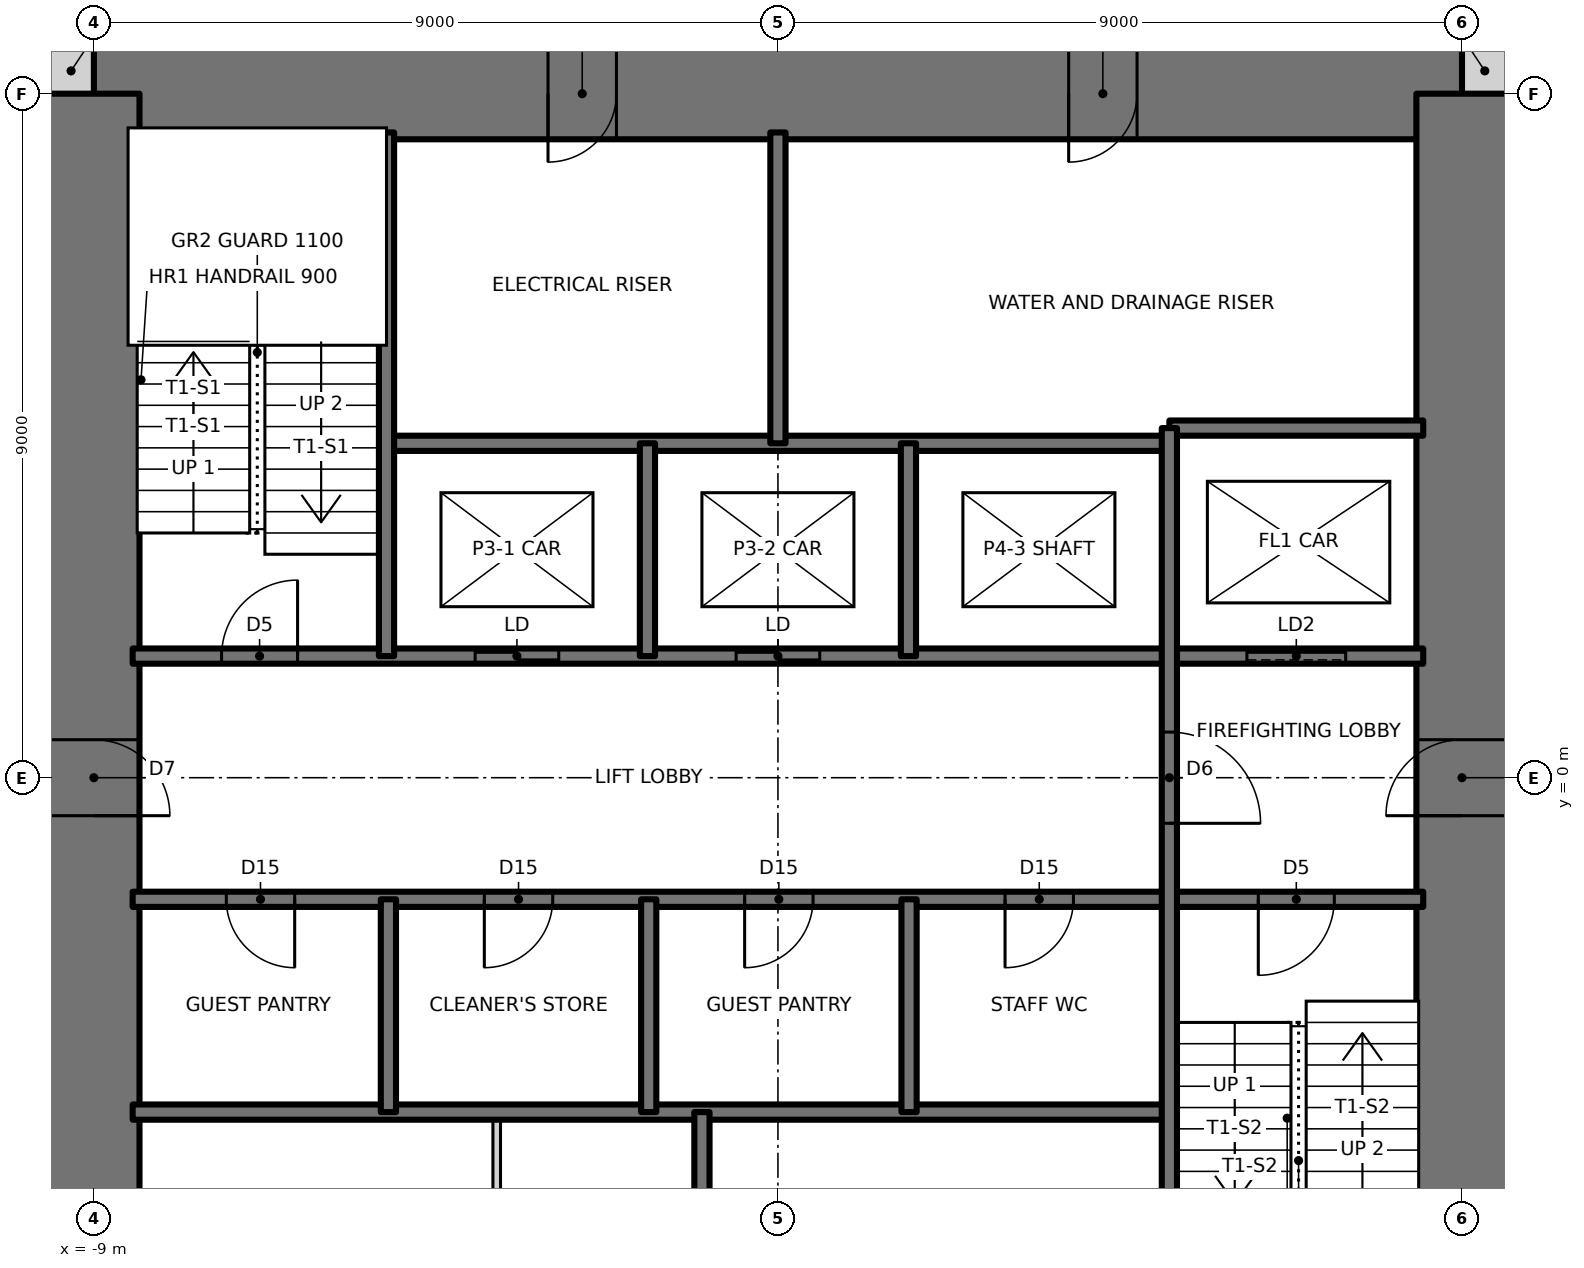
"""IFC4 building model, lengths in metres.
Left out: names, types, materials, properties, quantities, classifications, styles, units other than length and angle.
Written with IfcOpenShell. Run it as: python <this file> out.ifc"""

import sys

from ifc_helpers import new_model, si_unit, direction, frame, frame_2d, origin, place, context, subcontext, project, spatial, rectangle, extrude, element, fill, save


model = new_model("IFC4")
c1 = context("Model", 3, precision=1e-05, world=origin(), true_north=direction((0.0, 1.0)))
c2 = subcontext(c1, "Body", "Model", "MODEL_VIEW")
j1 = project(units=[si_unit("LENGTHUNIT", "METRE"), si_unit("PLANEANGLEUNIT", "RADIAN")], contexts=[c1])
p1 = place(None, origin())
s1 = spatial("IfcSite", under=j1, at=p1, CompositionType="ELEMENT")
p2 = place(p1, origin())
s2 = spatial("IfcBuilding", under=s1, at=p2, CompositionType="ELEMENT")
p3 = place(p2, frame((0.0, 0.0, 170.5)))
s3 = spatial("IfcBuildingStorey", under=s2, at=p3, CompositionType="ELEMENT", Elevation=170.5)
for number, where, z_axis, x_axis in (
    (1, (9.0, 9.3, 0.0), (0.0, 0.0, 1.0), (1.0, 0.0, 0.0)),
    (2, (-9.6, 9.3, 0.0), (0.0, 0.0, 1.0), (1.0, 0.0, 0.0)),
):
    element("IfcWall", number, at=place(p3, frame(where, z_axis=z_axis, x_axis=x_axis)), inside=s3, PredefinedType="SOLIDWALL", context=c2, shape_type="SweptSolid", body=[
        extrude(rectangle(XDim=0.6, YDim=0.6, at=frame_2d((0.3, 0.0))), origin(), (0.0, 0.0, 1.0), 3.5),
    ])
p4 = place(p3, frame((9.0, 9.0, 0.0), z_axis=(0.0, 0.0, 1.0), x_axis=(-1.0, 0.0, 0.0)))
e3 = element("IfcWall", 3, at=p4, inside=s3, PredefinedType="SHEAR", context=c2, shape_type="SweptSolid", body=[
    extrude(rectangle(XDim=18.0, YDim=1.2, at=frame_2d((9.0, 0.0))), origin(), (0.0, 0.0, 1.0), 3.5),
])
p5 = place(p4, frame((11.125, 0.0, 0.0)))
e4 = element("IfcOpeningElement", 4, at=p5, cuts=e3, PredefinedType="OPENING", context=c2, shape_type="SweptSolid", body=[
    extrude(rectangle(XDim=0.9, YDim=2.1, at=frame_2d((0.45, 1.05))), frame((0.0, 0.61, 0.0), z_axis=(0.0, -1.0, 0.0), x_axis=(1.0, 0.0, 0.0)), (0.0, 0.0, 1.0), 1.22),
])
p6 = place(p4, frame((4.275, 0.0, 0.0)))
e5 = element("IfcOpeningElement", 5, at=p6, cuts=e3, PredefinedType="OPENING", context=c2, shape_type="SweptSolid", body=[
    extrude(rectangle(XDim=0.9, YDim=2.1, at=frame_2d((0.45, 1.05))), frame((0.0, 0.61, 0.0), z_axis=(0.0, -1.0, 0.0), x_axis=(1.0, 0.0, 0.0)), (0.0, 0.0, 1.0), 1.22),
])
p7 = place(p3, frame((9.0, -9.0, 0.0), z_axis=(0.0, 0.0, 1.0), x_axis=(0.0, 1.0, 0.0)))
e6 = element("IfcWall", 6, at=p7, inside=s3, PredefinedType="SHEAR", context=c2, shape_type="SweptSolid", body=[
    extrude(rectangle(XDim=18.0, YDim=1.2, at=frame_2d((9.0, 0.0))), origin(), (0.0, 0.0, 1.0), 3.5),
])
p8 = place(p7, frame((8.5, 0.0, 0.0)))
e7 = element("IfcOpeningElement", 7, at=p8, cuts=e6, PredefinedType="OPENING", context=c2, shape_type="SweptSolid", body=[
    extrude(rectangle(XDim=1.0, YDim=2.1, at=frame_2d((0.5, 1.05))), frame((0.0, 0.61, 0.0), z_axis=(0.0, -1.0, 0.0), x_axis=(1.0, 0.0, 0.0)), (0.0, 0.0, 1.0), 1.22),
])
p9 = place(p3, frame((-9.0, 9.0, 0.0), z_axis=(0.0, 0.0, 1.0), x_axis=(0.0, -1.0, 0.0)))
e8 = element("IfcWall", 8, at=p9, inside=s3, PredefinedType="SHEAR", context=c2, shape_type="SweptSolid", body=[
    extrude(rectangle(XDim=18.0, YDim=1.2, at=frame_2d((9.0, 0.0))), origin(), (0.0, 0.0, 1.0), 3.5),
])
p10 = place(p9, frame((8.5, 0.0, 0.0)))
e9 = element("IfcOpeningElement", 9, at=p10, cuts=e8, PredefinedType="OPENING", context=c2, shape_type="SweptSolid", body=[
    extrude(rectangle(XDim=1.0, YDim=2.1, at=frame_2d((0.5, 1.05))), frame((0.0, 0.61, 0.0), z_axis=(0.0, -1.0, 0.0), x_axis=(1.0, 0.0, 0.0)), (0.0, 0.0, 1.0), 1.22),
])
p11 = place(p3, frame((-8.49, -4.4, 0.0), z_axis=(0.0, 0.0, 1.0), x_axis=(1.0, 0.0, 0.0)))
e10 = element("IfcWall", 10, at=p11, inside=s3, PredefinedType="SOLIDWALL", context=c2, shape_type="SweptSolid", body=[
    extrude(rectangle(XDim=13.64, YDim=0.2, at=frame_2d((6.82, 0.0))), origin(), (0.0, 0.0, 1.0), 3.5),
])
p12 = place(p3, frame((-8.49, -1.6, 0.0), z_axis=(0.0, 0.0, 1.0), x_axis=(1.0, 0.0, 0.0)))
e11 = element("IfcWall", 11, at=p12, inside=s3, PredefinedType="SOLIDWALL", context=c2, shape_type="SweptSolid", body=[
    extrude(rectangle(XDim=16.98, YDim=0.2, at=frame_2d((8.49, 0.0))), origin(), (0.0, 0.0, 1.0), 3.5),
])
p13 = place(p12, frame((14.81, 0.0, 0.0)))
e12 = element("IfcOpeningElement", 12, at=p13, cuts=e11, PredefinedType="OPENING", context=c2, shape_type="SweptSolid", body=[
    extrude(rectangle(XDim=1.0, YDim=2.1, at=frame_2d((0.5, 1.05))), frame((0.0, 0.11, 0.0), z_axis=(0.0, -1.0, 0.0), x_axis=(1.0, 0.0, 0.0)), (0.0, 0.0, 1.0), 0.22),
])
p14 = place(p12, frame((1.232, 0.0, 0.0)))
e13 = element("IfcOpeningElement", 13, at=p14, cuts=e11, PredefinedType="OPENING", context=c2, shape_type="SweptSolid", body=[
    extrude(rectangle(XDim=0.9, YDim=2.1, at=frame_2d((0.45, 1.05))), frame((0.0, 0.11, 0.0), z_axis=(0.0, -1.0, 0.0), x_axis=(1.0, 0.0, 0.0)), (0.0, 0.0, 1.0), 0.22),
])
p15 = place(p12, frame((4.627, 0.0, 0.0)))
e14 = element("IfcOpeningElement", 14, at=p15, cuts=e11, PredefinedType="OPENING", context=c2, shape_type="SweptSolid", body=[
    extrude(rectangle(XDim=0.9, YDim=2.1, at=frame_2d((0.45, 1.05))), frame((0.0, 0.11, 0.0), z_axis=(0.0, -1.0, 0.0), x_axis=(1.0, 0.0, 0.0)), (0.0, 0.0, 1.0), 0.22),
])
p16 = place(p12, frame((8.052, 0.0, 0.0)))
e15 = element("IfcOpeningElement", 15, at=p16, cuts=e11, PredefinedType="OPENING", context=c2, shape_type="SweptSolid", body=[
    extrude(rectangle(XDim=0.9, YDim=2.1, at=frame_2d((0.45, 1.05))), frame((0.0, 0.11, 0.0), z_axis=(0.0, -1.0, 0.0), x_axis=(1.0, 0.0, 0.0)), (0.0, 0.0, 1.0), 0.22),
])
p17 = place(p12, frame((11.478, 0.0, 0.0)))
e16 = element("IfcOpeningElement", 16, at=p17, cuts=e11, PredefinedType="OPENING", context=c2, shape_type="SweptSolid", body=[
    extrude(rectangle(XDim=0.9, YDim=2.1, at=frame_2d((0.45, 1.05))), frame((0.0, 0.11, 0.0), z_axis=(0.0, -1.0, 0.0), x_axis=(1.0, 0.0, 0.0)), (0.0, 0.0, 1.0), 0.22),
])
p18 = place(p3, frame((-8.49, 1.6, 0.0), z_axis=(0.0, 0.0, 1.0), x_axis=(1.0, 0.0, 0.0)))
e17 = element("IfcWall", 17, at=p18, inside=s3, PredefinedType="SOLIDWALL", context=c2, shape_type="SweptSolid", body=[
    extrude(rectangle(XDim=16.98, YDim=0.2, at=frame_2d((8.49, 0.0))), origin(), (0.0, 0.0, 1.0), 3.5),
])
p19 = place(p18, frame((1.17, 0.0, 0.0)))
e18 = element("IfcOpeningElement", 18, at=p19, cuts=e17, PredefinedType="OPENING", context=c2, shape_type="SweptSolid", body=[
    extrude(rectangle(XDim=1.0, YDim=2.1, at=frame_2d((0.5, 1.05))), frame((0.0, 0.11, 0.0), z_axis=(0.0, -1.0, 0.0), x_axis=(1.0, 0.0, 0.0)), (0.0, 0.0, 1.0), 0.22),
])
p20 = place(p18, frame((4.506, 0.0, 0.0)))
e19 = element("IfcOpeningElement", 19, at=p20, cuts=e17, PredefinedType="OPENING", context=c2, shape_type="SweptSolid", body=[
    extrude(rectangle(XDim=1.1, YDim=2.1, at=frame_2d((0.55, 1.05))), frame((0.0, 0.11, 0.0), z_axis=(0.0, -1.0, 0.0), x_axis=(1.0, 0.0, 0.0)), (0.0, 0.0, 1.0), 0.22),
])
p21 = place(p18, frame((7.94, 0.0, 0.0)))
e20 = element("IfcOpeningElement", 20, at=p21, cuts=e17, PredefinedType="OPENING", context=c2, shape_type="SweptSolid", body=[
    extrude(rectangle(XDim=1.1, YDim=2.1, at=frame_2d((0.55, 1.05))), frame((0.0, 0.11, 0.0), z_axis=(0.0, -1.0, 0.0), x_axis=(1.0, 0.0, 0.0)), (0.0, 0.0, 1.0), 0.22),
])
p22 = place(p18, frame((14.66, 0.0, 0.0)))
e21 = element("IfcOpeningElement", 21, at=p22, cuts=e17, PredefinedType="OPENING", context=c2, shape_type="SweptSolid", body=[
    extrude(rectangle(XDim=1.3, YDim=2.1, at=frame_2d((0.65, 1.05))), frame((0.0, 0.11, 0.0), z_axis=(0.0, -1.0, 0.0), x_axis=(1.0, 0.0, 0.0)), (0.0, 0.0, 1.0), 0.22),
])
p23 = place(p3, frame((-5.15, 4.4, 0.0), z_axis=(0.0, 0.0, 1.0), x_axis=(1.0, 0.0, 0.0)))
e22 = element("IfcWall", 22, at=p23, inside=s3, PredefinedType="SOLIDWALL", context=c2, shape_type="SweptSolid", body=[
    extrude(rectangle(XDim=10.3, YDim=0.2, at=frame_2d((5.15, 0.0))), origin(), (0.0, 0.0, 1.0), 3.5),
])
p24 = place(p3, frame((5.15, 4.6, 0.0), z_axis=(0.0, 0.0, 1.0), x_axis=(1.0, 0.0, 0.0)))
e23 = element("IfcWall", 23, at=p24, inside=s3, PredefinedType="SOLIDWALL", context=c2, shape_type="SweptSolid", body=[
    extrude(rectangle(XDim=3.34, YDim=0.2, at=frame_2d((1.67, 0.0))), origin(), (0.0, 0.0, 1.0), 3.5),
])
p25 = place(p3, frame((5.15, -8.49, 0.0), z_axis=(0.0, 0.0, 1.0), x_axis=(0.0, 1.0, 0.0)))
e24 = element("IfcWall", 24, at=p25, inside=s3, PredefinedType="SOLIDWALL", context=c2, shape_type="SweptSolid", body=[
    extrude(rectangle(XDim=13.09, YDim=0.2, at=frame_2d((6.545, 0.0))), origin(), (0.0, 0.0, 1.0), 3.5),
])
p26 = place(p25, frame((7.89, 0.0, 0.0)))
e25 = element("IfcOpeningElement", 25, at=p26, cuts=e24, PredefinedType="OPENING", context=c2, shape_type="SweptSolid", body=[
    extrude(rectangle(XDim=1.2, YDim=2.1, at=frame_2d((0.6, 1.05))), frame((0.0, 0.11, 0.0), z_axis=(0.0, -1.0, 0.0), x_axis=(1.0, 0.0, 0.0)), (0.0, 0.0, 1.0), 0.22),
])
for number, where, z_axis, x_axis in (
    (26, (1.725, -4.4, 0.0), (0.0, 0.0, 1.0), (0.0, 1.0, 0.0)),
    (27, (1.717, 1.6, 0.0), (0.0, 0.0, 1.0), (0.0, 1.0, 0.0)),
):
    element("IfcWall", number, at=place(p3, frame(where, z_axis=z_axis, x_axis=x_axis)), inside=s3, PredefinedType="SOLIDWALL", context=c2, shape_type="SweptSolid", body=[
        extrude(rectangle(XDim=2.8, YDim=0.2, at=frame_2d((1.4, 0.0))), origin(), (0.0, 0.0, 1.0), 3.5),
    ])
for number, where, z_axis, x_axis in (
    (28, (0.0, 4.4, 0.0), (0.0, 0.0, 1.0), (0.0, 1.0, 0.0)),
    (29, (-1.0, -8.49, 0.0), (0.0, 0.0, 1.0), (0.0, 1.0, 0.0)),
):
    element("IfcWall", number, at=place(p3, frame(where, z_axis=z_axis, x_axis=x_axis)), inside=s3, PredefinedType="SOLIDWALL", context=c2, shape_type="SweptSolid", body=[
        extrude(rectangle(XDim=4.09, YDim=0.2, at=frame_2d((2.045, 0.0))), origin(), (0.0, 0.0, 1.0), 3.5),
    ])
for number, where, z_axis, x_axis in (
    (30, (-1.7, -4.4, 0.0), (0.0, 0.0, 1.0), (0.0, 1.0, 0.0)),
    (31, (-1.717, 1.6, 0.0), (0.0, 0.0, 1.0), (0.0, 1.0, 0.0)),
):
    element("IfcWall", number, at=place(p3, frame(where, z_axis=z_axis, x_axis=x_axis)), inside=s3, PredefinedType="SOLIDWALL", context=c2, shape_type="SweptSolid", body=[
        extrude(rectangle(XDim=2.8, YDim=0.2, at=frame_2d((1.4, 0.0))), origin(), (0.0, 0.0, 1.0), 3.5),
    ])
p27 = place(p3, frame((-3.7, -8.49, 0.0), z_axis=(0.0, 0.0, 1.0), x_axis=(0.0, 1.0, 0.0)))
e32 = element("IfcWall", 32, at=p27, inside=s3, PredefinedType="PARTITIONING", context=c2, shape_type="SweptSolid", body=[
    extrude(rectangle(XDim=4.09, YDim=0.1, at=frame_2d((2.045, 0.0))), origin(), (0.0, 0.0, 1.0), 3.3),
])
p28 = place(p27, frame((1.595, 0.0, 0.0)))
e33 = element("IfcOpeningElement", 33, at=p28, cuts=e32, PredefinedType="OPENING", context=c2, shape_type="SweptSolid", body=[
    extrude(rectangle(XDim=0.9, YDim=2.1, at=frame_2d((0.45, 1.05))), frame((0.0, 0.06, 0.0), z_axis=(0.0, -1.0, 0.0), x_axis=(1.0, 0.0, 0.0)), (0.0, 0.0, 1.0), 0.12),
])
p29 = place(p3, frame((-5.125, -4.4, 0.0), z_axis=(0.0, 0.0, 1.0), x_axis=(0.0, 1.0, 0.0)))
e34 = element("IfcWall", 34, at=p29, inside=s3, PredefinedType="SOLIDWALL", context=c2, shape_type="SweptSolid", body=[
    extrude(rectangle(XDim=2.8, YDim=0.2, at=frame_2d((1.4, 0.0))), origin(), (0.0, 0.0, 1.0), 3.5),
])
p30 = place(p3, frame((-5.15, 1.6, 0.0), z_axis=(0.0, 0.0, 1.0), x_axis=(0.0, 1.0, 0.0)))
e35 = element("IfcWall", 35, at=p30, inside=s3, PredefinedType="SOLIDWALL", context=c2, shape_type="SweptSolid", body=[
    extrude(rectangle(XDim=6.89, YDim=0.2, at=frame_2d((3.445, 0.0))), origin(), (0.0, 0.0, 1.0), 3.5),
])
p31 = place(p19, origin())
e36 = element("IfcDoor", 36, at=p31, inside=s3, OperationType="SINGLE_SWING_RIGHT", PredefinedType="DOOR", context=c2, shape_type="SweptSolid", body=[
    extrude(rectangle(XDim=1.0, YDim=2.1, at=frame_2d((0.5, 1.05))), frame((0.0, 0.025, 0.0), z_axis=(0.0, -1.0, 0.0), x_axis=(1.0, 0.0, 0.0)), (0.0, 0.0, 1.0), 0.05),
])
fill(e18, e36)
p32 = place(p13, frame((1.0, 0.0, 0.0), z_axis=(0.0, 0.0, 1.0), x_axis=(-1.0, 0.0, 0.0)))
e37 = element("IfcDoor", 37, at=p32, inside=s3, OperationType="SINGLE_SWING_RIGHT", PredefinedType="DOOR", context=c2, shape_type="SweptSolid", body=[
    extrude(rectangle(XDim=1.0, YDim=2.1, at=frame_2d((0.5, 1.05))), frame((0.0, 0.025, 0.0), z_axis=(0.0, -1.0, 0.0), x_axis=(1.0, 0.0, 0.0)), (0.0, 0.0, 1.0), 0.05),
])
fill(e12, e37)
p33 = place(p26, frame((1.2, 0.0, 0.0), z_axis=(0.0, 0.0, 1.0), x_axis=(-1.0, 0.0, 0.0)))
e38 = element("IfcDoor", 38, at=p33, inside=s3, OperationType="SINGLE_SWING_RIGHT", PredefinedType="DOOR", context=c2, shape_type="SweptSolid", body=[
    extrude(rectangle(XDim=1.2, YDim=2.1, at=frame_2d((0.6, 1.05))), frame((0.0, 0.025, 0.0), z_axis=(0.0, -1.0, 0.0), x_axis=(1.0, 0.0, 0.0)), (0.0, 0.0, 1.0), 0.05),
])
fill(e25, e38)
p34 = place(p14, frame((0.9, 0.0, 0.0), z_axis=(0.0, 0.0, 1.0), x_axis=(-1.0, 0.0, 0.0)))
e39 = element("IfcDoor", 39, at=p34, inside=s3, OperationType="SINGLE_SWING_LEFT", PredefinedType="DOOR", context=c2, shape_type="SweptSolid", body=[
    extrude(rectangle(XDim=0.9, YDim=2.1, at=frame_2d((0.45, 1.05))), frame((0.0, 0.025, 0.0), z_axis=(0.0, -1.0, 0.0), x_axis=(1.0, 0.0, 0.0)), (0.0, 0.0, 1.0), 0.05),
])
fill(e13, e39)
p35 = place(p15, frame((0.9, 0.0, 0.0), z_axis=(0.0, 0.0, 1.0), x_axis=(-1.0, 0.0, 0.0)))
e40 = element("IfcDoor", 40, at=p35, inside=s3, OperationType="SINGLE_SWING_RIGHT", PredefinedType="DOOR", context=c2, shape_type="SweptSolid", body=[
    extrude(rectangle(XDim=0.9, YDim=2.1, at=frame_2d((0.45, 1.05))), frame((0.0, 0.025, 0.0), z_axis=(0.0, -1.0, 0.0), x_axis=(1.0, 0.0, 0.0)), (0.0, 0.0, 1.0), 0.05),
])
fill(e14, e40)
p36 = place(p16, frame((0.9, 0.0, 0.0), z_axis=(0.0, 0.0, 1.0), x_axis=(-1.0, 0.0, 0.0)))
e41 = element("IfcDoor", 41, at=p36, inside=s3, OperationType="SINGLE_SWING_RIGHT", PredefinedType="DOOR", context=c2, shape_type="SweptSolid", body=[
    extrude(rectangle(XDim=0.9, YDim=2.1, at=frame_2d((0.45, 1.05))), frame((0.0, 0.025, 0.0), z_axis=(0.0, -1.0, 0.0), x_axis=(1.0, 0.0, 0.0)), (0.0, 0.0, 1.0), 0.05),
])
fill(e15, e41)
p37 = place(p17, frame((0.9, 0.0, 0.0), z_axis=(0.0, 0.0, 1.0), x_axis=(-1.0, 0.0, 0.0)))
e42 = element("IfcDoor", 42, at=p37, inside=s3, OperationType="SINGLE_SWING_RIGHT", PredefinedType="DOOR", context=c2, shape_type="SweptSolid", body=[
    extrude(rectangle(XDim=0.9, YDim=2.1, at=frame_2d((0.45, 1.05))), frame((0.0, 0.025, 0.0), z_axis=(0.0, -1.0, 0.0), x_axis=(1.0, 0.0, 0.0)), (0.0, 0.0, 1.0), 0.05),
])
fill(e16, e42)
p38 = place(p10, origin())
e43 = element("IfcDoor", 43, at=p38, inside=s3, OperationType="SINGLE_SWING_RIGHT", PredefinedType="DOOR", context=c2, shape_type="SweptSolid", body=[
    extrude(rectangle(XDim=1.0, YDim=2.1, at=frame_2d((0.5, 1.05))), frame((0.0, 0.025, 0.0), z_axis=(0.0, -1.0, 0.0), x_axis=(1.0, 0.0, 0.0)), (0.0, 0.0, 1.0), 0.05),
])
fill(e9, e43)
p39 = place(p8, origin())
e44 = element("IfcDoor", 44, at=p39, inside=s3, OperationType="SINGLE_SWING_LEFT", PredefinedType="DOOR", context=c2, shape_type="SweptSolid", body=[
    extrude(rectangle(XDim=1.0, YDim=2.1, at=frame_2d((0.5, 1.05))), frame((0.0, 0.025, 0.0), z_axis=(0.0, -1.0, 0.0), x_axis=(1.0, 0.0, 0.0)), (0.0, 0.0, 1.0), 0.05),
])
fill(e7, e44)
p40 = place(p5, origin())
e45 = element("IfcDoor", 45, at=p40, inside=s3, OperationType="SINGLE_SWING_RIGHT", PredefinedType="DOOR", context=c2, shape_type="SweptSolid", body=[
    extrude(rectangle(XDim=0.9, YDim=2.1, at=frame_2d((0.45, 1.05))), frame((0.0, 0.025, 0.0), z_axis=(0.0, -1.0, 0.0), x_axis=(1.0, 0.0, 0.0)), (0.0, 0.0, 1.0), 0.05),
])
fill(e4, e45)
p41 = place(p6, origin())
e46 = element("IfcDoor", 46, at=p41, inside=s3, OperationType="SINGLE_SWING_RIGHT", PredefinedType="DOOR", context=c2, shape_type="SweptSolid", body=[
    extrude(rectangle(XDim=0.9, YDim=2.1, at=frame_2d((0.45, 1.05))), frame((0.0, 0.025, 0.0), z_axis=(0.0, -1.0, 0.0), x_axis=(1.0, 0.0, 0.0)), (0.0, 0.0, 1.0), 0.05),
])
fill(e5, e46)
p42 = place(p20, origin())
e47 = element("IfcDoor", 47, at=p42, inside=s3, OperationType="DOUBLE_DOOR_SLIDING", PredefinedType="DOOR", context=c2, shape_type="SweptSolid", body=[
    extrude(rectangle(XDim=1.1, YDim=2.1, at=frame_2d((0.55, 1.05))), frame((0.0, 0.025, 0.0), z_axis=(0.0, -1.0, 0.0), x_axis=(1.0, 0.0, 0.0)), (0.0, 0.0, 1.0), 0.05),
])
fill(e19, e47)
p43 = place(p21, origin())
e48 = element("IfcDoor", 48, at=p43, inside=s3, OperationType="DOUBLE_DOOR_SLIDING", PredefinedType="DOOR", context=c2, shape_type="SweptSolid", body=[
    extrude(rectangle(XDim=1.1, YDim=2.1, at=frame_2d((0.55, 1.05))), frame((0.0, 0.025, 0.0), z_axis=(0.0, -1.0, 0.0), x_axis=(1.0, 0.0, 0.0)), (0.0, 0.0, 1.0), 0.05),
])
fill(e20, e48)
p44 = place(p22, origin())
e49 = element("IfcDoor", 49, at=p44, inside=s3, OperationType="SLIDING_TO_LEFT", PredefinedType="DOOR", context=c2, shape_type="SweptSolid", body=[
    extrude(rectangle(XDim=1.3, YDim=2.1, at=frame_2d((0.65, 1.05))), frame((0.0, 0.025, 0.0), z_axis=(0.0, -1.0, 0.0), x_axis=(1.0, 0.0, 0.0)), (0.0, 0.0, 1.0), 0.05),
])
fill(e21, e49)
save(model, sys.argv[1])
